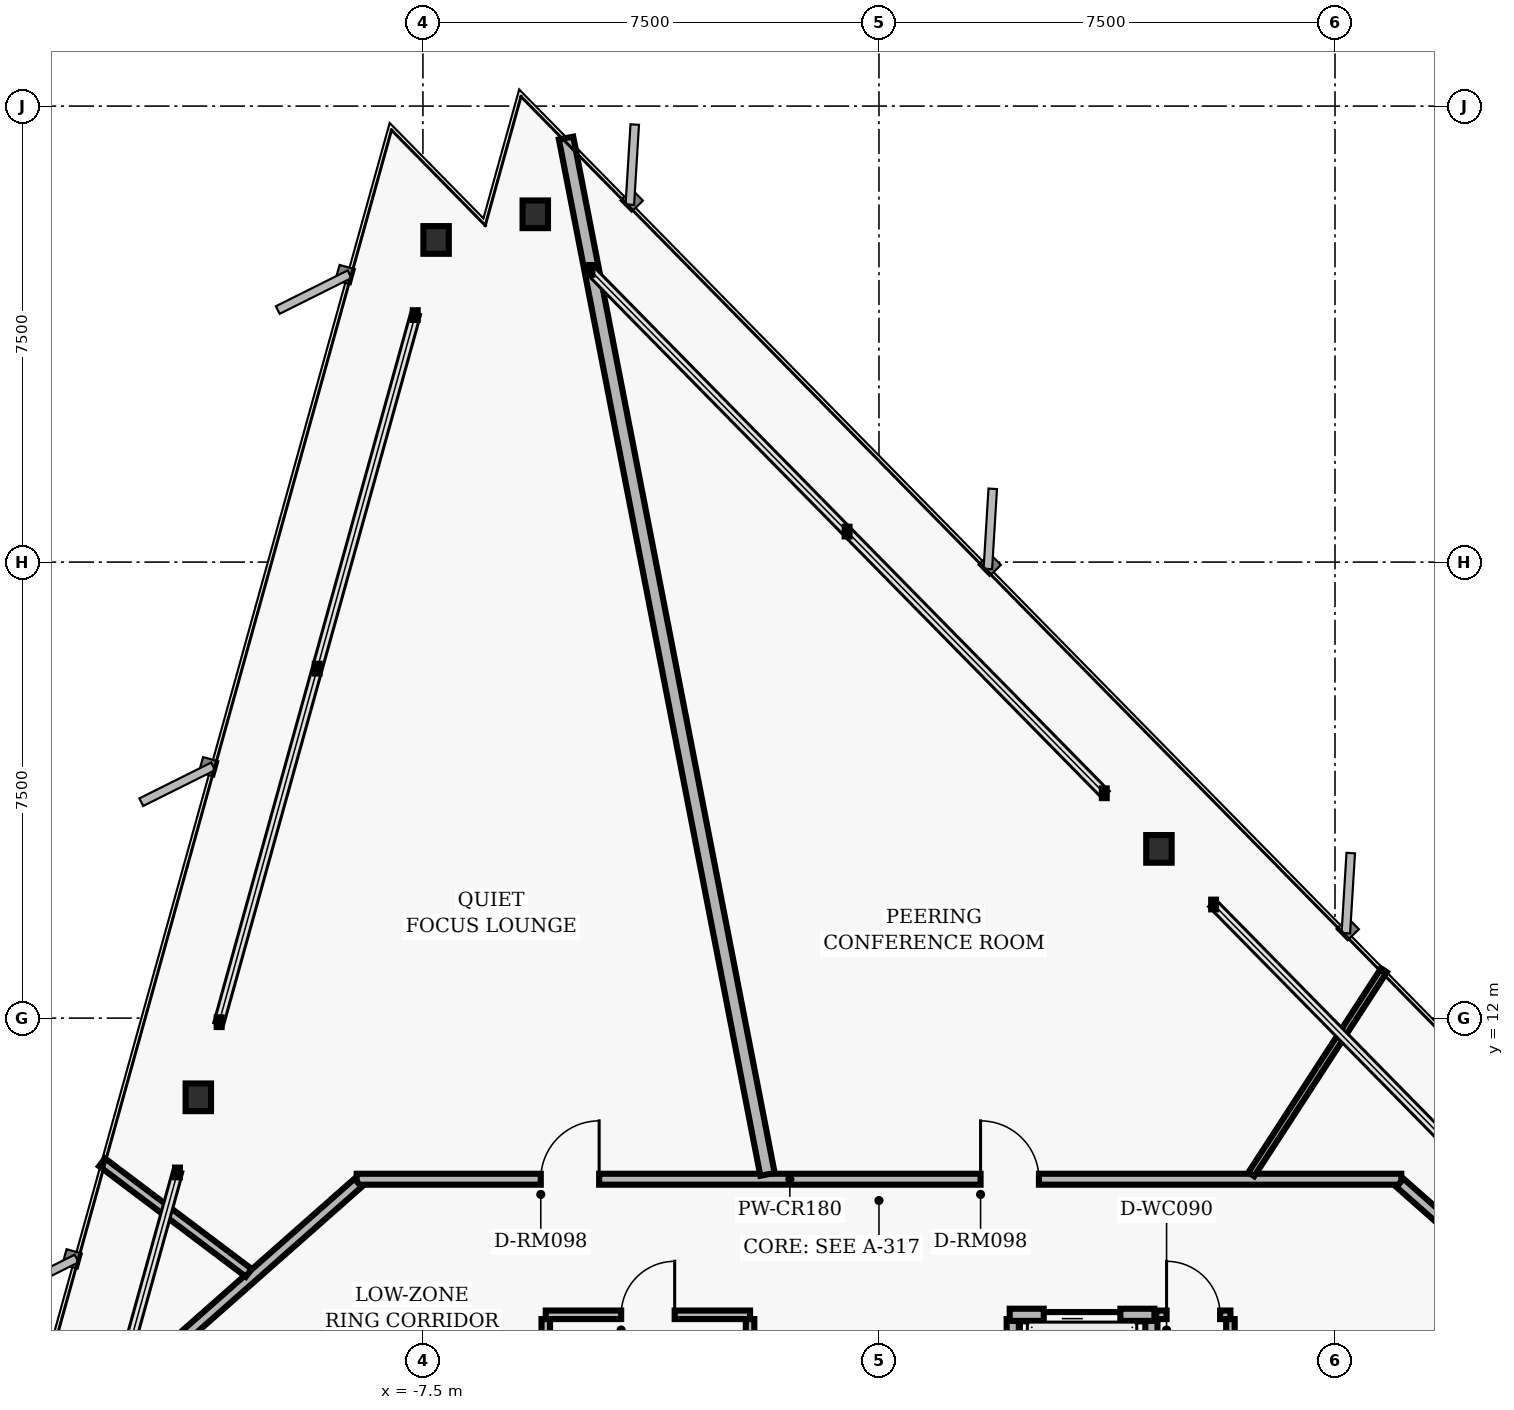
"""IFC4 building model, lengths in metres.
Left out: names, types, materials, properties, quantities, classifications, styles, units other than length and angle.
Written with IfcOpenShell. Run it as: python <this file> out.ifc"""

import sys

from ifc_helpers import new_model, si_unit, direction, frame, frame_2d, origin, origin_2d, place, context, subcontext, project, spatial, rectangle, i_section, extrude, element, fill, save


model = new_model("IFC4")
c1 = context("Model", 3, precision=1e-05, world=origin(), true_north=direction((0.0, 1.0)))
c2 = subcontext(c1, "Body", "Model", "MODEL_VIEW")
j1 = project(units=[si_unit("LENGTHUNIT", "METRE"), si_unit("PLANEANGLEUNIT", "RADIAN")], contexts=[c1])
p1 = place(None, origin())
s1 = spatial("IfcSite", under=j1, at=p1, CompositionType="ELEMENT")
p2 = place(p1, origin())
s2 = spatial("IfcBuilding", under=s1, at=p2, CompositionType="ELEMENT")
p3 = place(p2, frame((0.0, 0.0, 82.56)))
s3 = spatial("IfcBuildingStorey", under=s2, at=p3, CompositionType="ELEMENT", Elevation=82.56)
for number, where, z_axis, x_axis in (
    (1, (4.604, 14.783, 0.0), (0.0, 0.0, 1.0), (1.0, 0.0, 0.0)),
    (2, (-5.652, 25.22, 0.0), (0.0, 0.0, 1.0), (1.0, 0.0, 0.0)),
    (3, (-7.283, 24.798, 0.0), (0.0, 0.0, 1.0), (1.0, 0.0, 0.0)),
    (4, (-11.194, 10.697, 0.0), (0.0, 0.0, 1.0), (1.0, 0.0, 0.0)),
):
    element("IfcColumn", number, at=place(p3, frame(where, z_axis=z_axis, x_axis=x_axis)), inside=s3, PredefinedType="COLUMN", context=c2, shape_type="SweptSolid", body=[
        extrude(i_section(OverallWidth=0.418, OverallDepth=0.455, WebThickness=0.042, FlangeThickness=0.068, FilletRadius=0.025, at=origin_2d()), origin(), (0.0, 0.0, 1.0), 3.04),
    ])
for number, where, z_axis, x_axis in (
    (5, (2.2, 4.95, 0.0), (0.0, 0.0, 1.0), (0.0, 1.0, 0.0)),
    (6, (4.48, 4.95, 0.0), (0.0, 0.0, 1.0), (0.0, 1.0, 0.0)),
):
    element("IfcWall", number, at=place(p3, frame(where, z_axis=z_axis, x_axis=x_axis)), inside=s3, PredefinedType="PARTITIONING", context=c2, shape_type="SweptSolid", body=[
        extrude(rectangle(XDim=2.1, YDim=0.2, at=frame_2d((1.05, 0.0))), origin(), (0.0, 0.0, 1.0), 2.763),
    ])
p4 = place(p3, frame((2.15, 7.12, 0.0), z_axis=(0.0, 0.0, 1.0), x_axis=(1.0, 0.0, 0.0)))
e7 = element("IfcWall", 7, at=p4, inside=s3, PredefinedType="PARTITIONING", context=c2, shape_type="SweptSolid", body=[
    extrude(rectangle(XDim=2.38, YDim=0.2, at=frame_2d((1.19, 0.0))), origin(), (0.0, 0.0, 1.0), 2.763),
])
p5 = place(p4, frame((0.56, 0.0, 0.0)))
e8 = element("IfcOpeningElement", 8, at=p5, cuts=e7, PredefinedType="OPENING", context=c2, shape_type="SweptSolid", body=[
    extrude(rectangle(XDim=1.26, YDim=2.06, at=frame_2d((0.63, 1.03))), frame((0.0, 0.11, 0.0), z_axis=(0.0, -1.0, 0.0), x_axis=(1.0, 0.0, 0.0)), (0.0, 0.0, 1.0), 0.22),
])
for number, where, z_axis, x_axis in (
    (9, (-5.48, 4.95, 0.0), (0.0, 0.0, 1.0), (0.0, 1.0, 0.0)),
    (10, (-2.12, 4.95, 0.0), (0.0, 0.0, 1.0), (0.0, 1.0, 0.0)),
):
    element("IfcWall", number, at=place(p3, frame(where, z_axis=z_axis, x_axis=x_axis)), inside=s3, PredefinedType="PARTITIONING", context=c2, shape_type="SweptSolid", body=[
        extrude(rectangle(XDim=2.1, YDim=0.14, at=frame_2d((1.05, 0.0))), origin(), (0.0, 0.0, 1.0), 2.763),
    ])
p6 = place(p3, frame((-5.48, 7.12, 0.0), z_axis=(0.0, 0.0, 1.0), x_axis=(1.0, 0.0, 0.0)))
e11 = element("IfcWall", 11, at=p6, inside=s3, PredefinedType="PARTITIONING", context=c2, shape_type="SweptSolid", body=[
    extrude(rectangle(XDim=3.36, YDim=0.14, at=frame_2d((1.68, 0.0))), origin(), (0.0, 0.0, 1.0), 2.763),
])
p7 = place(p6, frame((1.24, 0.0, 0.0)))
e12 = element("IfcOpeningElement", 12, at=p7, cuts=e11, PredefinedType="OPENING", context=c2, shape_type="SweptSolid", body=[
    extrude(rectangle(XDim=0.88, YDim=2.02, at=frame_2d((0.44, 1.01))), frame((0.0, 0.08, 0.0), z_axis=(0.0, -1.0, 0.0), x_axis=(1.0, 0.0, 0.0)), (0.0, 0.0, 1.0), 0.16),
])
p8 = place(p3, frame((5.78, 4.95, 0.0), z_axis=(0.0, 0.0, 1.0), x_axis=(0.0, 1.0, 0.0)))
e13 = element("IfcWall", 13, at=p8, inside=s3, PredefinedType="PARTITIONING", context=c2, shape_type="SweptSolid", body=[
    extrude(rectangle(XDim=2.1, YDim=0.14, at=frame_2d((1.05, 0.0))), origin(), (0.0, 0.0, 1.0), 2.763),
])
p9 = place(p3, frame((4.56, 7.12, 0.0), z_axis=(0.0, 0.0, 1.0), x_axis=(1.0, 0.0, 0.0)))
e14 = element("IfcWall", 14, at=p9, inside=s3, PredefinedType="PARTITIONING", context=c2, shape_type="SweptSolid", body=[
    extrude(rectangle(XDim=1.22, YDim=0.14, at=frame_2d((0.61, 0.0))), origin(), (0.0, 0.0, 1.0), 2.763),
])
p10 = place(p9, frame((0.17, 0.0, 0.0)))
e15 = element("IfcOpeningElement", 15, at=p10, cuts=e14, PredefinedType="OPENING", context=c2, shape_type="SweptSolid", body=[
    extrude(rectangle(XDim=0.88, YDim=2.02, at=frame_2d((0.44, 1.01))), frame((0.0, 0.08, 0.0), z_axis=(0.0, -1.0, 0.0), x_axis=(1.0, 0.0, 0.0)), (0.0, 0.0, 1.0), 0.16),
])
p11 = place(p3, frame((-8.59, 9.35, 0.0), z_axis=(0.0, 0.0, 1.0), x_axis=(1.0, 0.0, 0.0)))
e16 = element("IfcWall", 16, at=p11, inside=s3, PredefinedType="PARTITIONING", context=c2, shape_type="SweptSolid", body=[
    extrude(rectangle(XDim=17.18, YDim=0.18, at=frame_2d((8.59, 0.0))), origin(), (0.0, 0.0, 1.0), 2.277),
])
p12 = place(p11, frame((10.261, 0.0, 0.0)))
e17 = element("IfcOpeningElement", 17, at=p12, cuts=e16, PredefinedType="OPENING", context=c2, shape_type="SweptSolid", body=[
    extrude(rectangle(XDim=0.96, YDim=2.02, at=frame_2d((0.48, 1.01))), frame((0.0, 0.1, 0.0), z_axis=(0.0, -1.0, 0.0), x_axis=(1.0, 0.0, 0.0)), (0.0, 0.0, 1.0), 0.2),
])
p13 = place(p11, frame((3.028, 0.0, 0.0)))
e18 = element("IfcOpeningElement", 18, at=p13, cuts=e16, PredefinedType="OPENING", context=c2, shape_type="SweptSolid", body=[
    extrude(rectangle(XDim=0.96, YDim=2.02, at=frame_2d((0.48, 1.01))), frame((0.0, 0.1, 0.0), z_axis=(0.0, -1.0, 0.0), x_axis=(1.0, 0.0, 0.0)), (0.0, 0.0, 1.0), 0.2),
])
p14 = place(p3, frame((8.567, 9.29, 0.0), z_axis=(0.0, 0.0, 1.0), x_axis=(0.749626463267, -0.66186113768, 0.0)))
e19 = element("IfcWall", 19, at=p14, inside=s3, PredefinedType="PARTITIONING", context=c2, shape_type="SweptSolid", body=[
    extrude(rectangle(XDim=6.27, YDim=0.18, at=frame_2d((3.135, 0.0))), origin(), (0.0, 0.0, 1.0), 2.277),
])
p15 = place(p14, frame((2.655, 0.0, 0.0)))
e20 = element("IfcOpeningElement", 20, at=p15, cuts=e19, PredefinedType="OPENING", context=c2, shape_type="SweptSolid", body=[
    extrude(rectangle(XDim=0.96, YDim=2.02, at=frame_2d((0.48, 1.01))), frame((0.0, 0.1, 0.0), z_axis=(0.0, -1.0, 0.0), x_axis=(1.0, 0.0, 0.0)), (0.0, 0.0, 1.0), 0.2),
])
p16 = place(p3, frame((-13.268, 5.14, 0.0), z_axis=(0.0, 0.0, 1.0), x_axis=(0.749626463267, 0.66186113768, 0.0)))
e21 = element("IfcWall", 21, at=p16, inside=s3, PredefinedType="PARTITIONING", context=c2, shape_type="SweptSolid", body=[
    extrude(rectangle(XDim=6.27, YDim=0.18, at=frame_2d((3.135, 0.0))), origin(), (0.0, 0.0, 1.0), 2.763),
])
p17 = place(p3, frame((6.124, 9.43, 0.0), z_axis=(0.0, 0.0, 1.0), x_axis=(0.544653909872, 0.838660907912, 0.0)))
e22 = element("IfcWall", 22, at=p17, inside=s3, PredefinedType="MOVABLE", context=c2, shape_type="SweptSolid", body=[
    extrude(rectangle(XDim=4.003, YDim=0.115, at=frame_2d((2.002, 0.0))), origin(), (0.0, 0.0, 1.0), 2.763),
])
p18 = place(p3, frame((-1.833, 9.43, 0.0), z_axis=(0.0, 0.0, 1.0), x_axis=(-0.190802669454, 0.981628413061, 0.0)))
e23 = element("IfcWall", 23, at=p18, inside=s3, PredefinedType="PARTITIONING", context=c2, shape_type="SweptSolid", body=[
    extrude(rectangle(XDim=17.364, YDim=0.24, at=frame_2d((8.682, 0.0))), origin(), (0.0, 0.0, 1.0), 2.763),
])
p19 = place(p3, frame((-10.365, 7.81, 0.0), z_axis=(0.0, 0.0, 1.0), x_axis=(-0.79865006228, 0.601795711201, 0.0)))
e24 = element("IfcWall", 24, at=p19, inside=s3, PredefinedType="PARTITIONING", context=c2, shape_type="SweptSolid", body=[
    extrude(rectangle(XDim=3.021, YDim=0.16, at=frame_2d((1.511, 0.0))), origin(), (0.0, 0.0, 1.0), 2.763),
])
p20 = place(p5, origin())
e25 = element("IfcDoor", 25, at=p20, inside=s3, OperationType="SLIDING_TO_LEFT", PredefinedType="DOOR", context=c2, shape_type="SweptSolid", body=[
    extrude(rectangle(XDim=1.26, YDim=2.06, at=frame_2d((0.63, 1.03))), frame((0.0, 0.025, 0.0), z_axis=(0.0, -1.0, 0.0), x_axis=(1.0, 0.0, 0.0)), (0.0, 0.0, 1.0), 0.05),
])
fill(e8, e25)
p21 = place(p7, origin())
e26 = element("IfcDoor", 26, at=p21, inside=s3, OperationType="SINGLE_SWING_RIGHT", PredefinedType="DOOR", context=c2, shape_type="SweptSolid", body=[
    extrude(rectangle(XDim=0.88, YDim=2.02, at=frame_2d((0.44, 1.01))), frame((0.0, 0.025, 0.0), z_axis=(0.0, -1.0, 0.0), x_axis=(1.0, 0.0, 0.0)), (0.0, 0.0, 1.0), 0.05),
])
fill(e12, e26)
p22 = place(p10, origin())
e27 = element("IfcDoor", 27, at=p22, inside=s3, OperationType="SINGLE_SWING_LEFT", PredefinedType="DOOR", context=c2, shape_type="SweptSolid", body=[
    extrude(rectangle(XDim=0.88, YDim=2.02, at=frame_2d((0.44, 1.01))), frame((0.0, 0.025, 0.0), z_axis=(0.0, -1.0, 0.0), x_axis=(1.0, 0.0, 0.0)), (0.0, 0.0, 1.0), 0.05),
])
fill(e15, e27)
p23 = place(p12, origin())
e28 = element("IfcDoor", 28, at=p23, inside=s3, OperationType="SINGLE_SWING_LEFT", PredefinedType="DOOR", context=c2, shape_type="SweptSolid", body=[
    extrude(rectangle(XDim=0.96, YDim=2.02, at=frame_2d((0.48, 1.01))), frame((0.0, 0.025, 0.0), z_axis=(0.0, -1.0, 0.0), x_axis=(1.0, 0.0, 0.0)), (0.0, 0.0, 1.0), 0.05),
])
fill(e17, e28)
p24 = place(p13, origin())
e29 = element("IfcDoor", 29, at=p24, inside=s3, OperationType="SINGLE_SWING_RIGHT", PredefinedType="DOOR", context=c2, shape_type="SweptSolid", body=[
    extrude(rectangle(XDim=0.96, YDim=2.02, at=frame_2d((0.48, 1.01))), frame((0.0, 0.025, 0.0), z_axis=(0.0, -1.0, 0.0), x_axis=(1.0, 0.0, 0.0)), (0.0, 0.0, 1.0), 0.05),
])
fill(e18, e29)
save(model, sys.argv[1])
